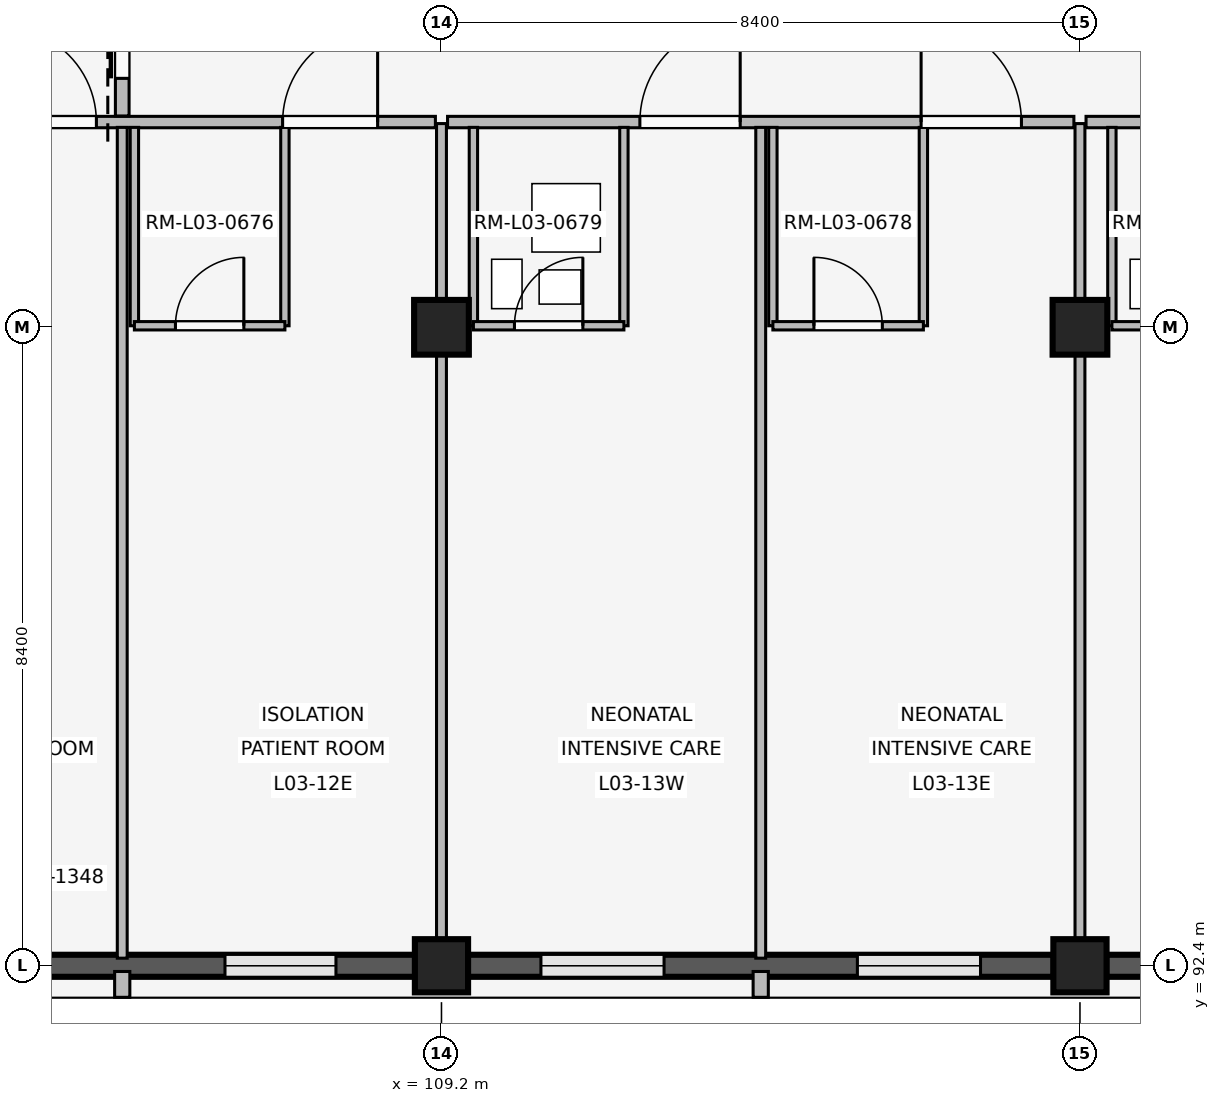
"""IFC4 building model, lengths in metres.
Left out: names, types, materials, properties, quantities, classifications, styles, units other than length and angle.
Written with IfcOpenShell. Run it as: python <this file> out.ifc"""

import sys

from ifc_helpers import new_model, si_unit, direction, frame, frame_2d, origin, origin_2d, place, context, subcontext, project, spatial, rectangle, extrude, element, fill, save


model = new_model("IFC4")
c1 = context("Model", 3, precision=1e-05, world=origin(), true_north=direction((0.0, 1.0)))
c2 = subcontext(c1, "Body", "Model", "MODEL_VIEW")
j1 = project(units=[si_unit("LENGTHUNIT", "METRE"), si_unit("PLANEANGLEUNIT", "RADIAN")], contexts=[c1])
p1 = place(None, origin())
s1 = spatial("IfcSite", under=j1, at=p1, CompositionType="ELEMENT")
p2 = place(p1, origin())
s2 = spatial("IfcBuilding", under=s1, at=p2, CompositionType="ELEMENT")
p3 = place(p2, frame((0.0, 0.0, 12.9)))
s3 = spatial("IfcBuildingStorey", under=s2, at=p3, CompositionType="ELEMENT", Elevation=12.9)
p4 = place(p3, frame((109.2, 92.4, 0.0), z_axis=(0.0, 0.0, 1.0), x_axis=(1.0, 0.0, 0.0)))
e1 = element("IfcColumn", 1, at=p4, inside=s3, PredefinedType="COLUMN", context=c2, shape_type="SweptSolid", body=[
    extrude(rectangle(XDim=0.7, YDim=0.7, at=origin_2d()), origin(), (0.0, 0.0, 1.0), 3.3),
])
p5 = place(p3, frame((109.2, 100.8, 0.0), z_axis=(0.0, 0.0, 1.0), x_axis=(1.0, 0.0, 0.0)))
e2 = element("IfcColumn", 2, at=p5, inside=s3, PredefinedType="COLUMN", context=c2, shape_type="SweptSolid", body=[
    extrude(rectangle(XDim=0.72, YDim=0.72, at=origin_2d()), origin(), (0.0, 0.0, 1.0), 3.3),
])
p6 = place(p3, frame((117.6, 92.4, 0.0), z_axis=(0.0, 0.0, 1.0), x_axis=(1.0, 0.0, 0.0)))
e3 = element("IfcColumn", 3, at=p6, inside=s3, PredefinedType="COLUMN", context=c2, shape_type="SweptSolid", body=[
    extrude(rectangle(XDim=0.7, YDim=0.7, at=origin_2d()), origin(), (0.0, 0.0, 1.0), 3.3),
])
p7 = place(p3, frame((117.6, 100.8, 0.0), z_axis=(0.0, 0.0, 1.0), x_axis=(1.0, 0.0, 0.0)))
e4 = element("IfcColumn", 4, at=p7, inside=s3, PredefinedType="COLUMN", context=c2, shape_type="SweptSolid", body=[
    extrude(rectangle(XDim=0.72, YDim=0.72, at=origin_2d()), origin(), (0.0, 0.0, 1.0), 3.3),
])
p8 = place(p3, frame((108.855, 92.4, 0.0), z_axis=(0.0, 0.0, 1.0), x_axis=(-1.0, 0.0, 0.0)))
e5 = element("IfcWall", 5, at=p8, inside=s3, PredefinedType="SOLIDWALL", context=c2, shape_type="SweptSolid", body=[
    extrude(rectangle(XDim=7.71, YDim=0.29, at=frame_2d((3.855, 0.0))), origin(), (0.0, 0.0, 1.0), 2.44),
])
p9 = place(p8, frame((1.043, 0.0, 0.85)))
e6 = element("IfcOpeningElement", 6, at=p9, cuts=e5, PredefinedType="OPENING", context=c2, shape_type="SweptSolid", body=[
    extrude(rectangle(XDim=1.46, YDim=0.85, at=frame_2d((0.73, 0.425))), frame((0.0, 0.155, 0.0), z_axis=(0.0, -1.0, 0.0), x_axis=(1.0, 0.0, 0.0)), (0.0, 0.0, 1.0), 0.31),
])
p10 = place(p8, frame((5.207, 0.0, 0.85)))
e7 = element("IfcOpeningElement", 7, at=p10, cuts=e5, PredefinedType="OPENING", context=c2, shape_type="SweptSolid", body=[
    extrude(rectangle(XDim=1.46, YDim=0.85, at=frame_2d((0.73, 0.425))), frame((0.0, 0.155, 0.0), z_axis=(0.0, -1.0, 0.0), x_axis=(1.0, 0.0, 0.0)), (0.0, 0.0, 1.0), 0.31),
])
p11 = place(p3, frame((105.0, 92.325, 0.0), z_axis=(0.0, 0.0, 1.0), x_axis=(0.0, -1.0, 0.0)))
e8 = element("IfcWall", 8, at=p11, inside=s3, PredefinedType="ELEMENTEDWALL", context=c2, shape_type="SweptSolid", body=[
    extrude(rectangle(XDim=0.34, YDim=0.2, at=frame_2d((0.17, 0.0))), origin(), (0.0, 0.0, 1.0), 2.42),
])
p12 = place(p3, frame((117.255, 92.4, 0.0), z_axis=(0.0, 0.0, 1.0), x_axis=(-1.0, 0.0, 0.0)))
e9 = element("IfcWall", 9, at=p12, inside=s3, PredefinedType="SOLIDWALL", context=c2, shape_type="SweptSolid", body=[
    extrude(rectangle(XDim=7.71, YDim=0.29, at=frame_2d((3.855, 0.0))), origin(), (0.0, 0.0, 1.0), 2.44),
])
p13 = place(p12, frame((0.963, 0.0, 0.85)))
e10 = element("IfcOpeningElement", 10, at=p13, cuts=e9, PredefinedType="OPENING", context=c2, shape_type="SweptSolid", body=[
    extrude(rectangle(XDim=1.62, YDim=0.95, at=frame_2d((0.81, 0.475))), frame((0.0, 0.155, 0.0), z_axis=(0.0, -1.0, 0.0), x_axis=(1.0, 0.0, 0.0)), (0.0, 0.0, 1.0), 0.31),
])
p14 = place(p12, frame((5.127, 0.0, 0.85)))
e11 = element("IfcOpeningElement", 11, at=p14, cuts=e9, PredefinedType="OPENING", context=c2, shape_type="SweptSolid", body=[
    extrude(rectangle(XDim=1.62, YDim=0.95, at=frame_2d((0.81, 0.475))), frame((0.0, 0.155, 0.0), z_axis=(0.0, -1.0, 0.0), x_axis=(1.0, 0.0, 0.0)), (0.0, 0.0, 1.0), 0.31),
])
p15 = place(p3, frame((113.4, 92.325, 0.0), z_axis=(0.0, 0.0, 1.0), x_axis=(0.0, -1.0, 0.0)))
e12 = element("IfcWall", 12, at=p15, inside=s3, PredefinedType="ELEMENTEDWALL", context=c2, shape_type="SweptSolid", body=[
    extrude(rectangle(XDim=0.34, YDim=0.2, at=frame_2d((0.17, 0.0))), origin(), (0.0, 0.0, 1.0), 2.42),
])
p16 = place(p3, frame((125.655, 92.4, 0.0), z_axis=(0.0, 0.0, 1.0), x_axis=(-1.0, 0.0, 0.0)))
e13 = element("IfcWall", 13, at=p16, inside=s3, PredefinedType="SOLIDWALL", context=c2, shape_type="SweptSolid", body=[
    extrude(rectangle(XDim=7.71, YDim=0.29, at=frame_2d((3.855, 0.0))), origin(), (0.0, 0.0, 1.0), 2.44),
])
p17 = place(p16, frame((1.043, 0.0, 0.85)))
e14 = element("IfcOpeningElement", 14, at=p17, cuts=e13, PredefinedType="OPENING", context=c2, shape_type="SweptSolid", body=[
    extrude(rectangle(XDim=1.46, YDim=0.85, at=frame_2d((0.73, 0.425))), frame((0.0, 0.155, 0.0), z_axis=(0.0, -1.0, 0.0), x_axis=(1.0, 0.0, 0.0)), (0.0, 0.0, 1.0), 0.31),
])
p18 = place(p16, frame((5.207, 0.0, 0.85)))
e15 = element("IfcOpeningElement", 15, at=p18, cuts=e13, PredefinedType="OPENING", context=c2, shape_type="SweptSolid", body=[
    extrude(rectangle(XDim=1.46, YDim=0.85, at=frame_2d((0.73, 0.425))), frame((0.0, 0.155, 0.0), z_axis=(0.0, -1.0, 0.0), x_axis=(1.0, 0.0, 0.0)), (0.0, 0.0, 1.0), 0.31),
])
p19 = place(p3, frame((100.88, 103.5, 0.0), z_axis=(0.0, 0.0, 1.0), x_axis=(1.0, 0.0, 0.0)))
e16 = element("IfcWall", 16, at=p19, inside=s3, PredefinedType="PARTITIONING", context=c2, shape_type="SweptSolid", body=[
    extrude(rectangle(XDim=8.24, YDim=0.15, at=frame_2d((4.12, 0.0))), origin(), (0.0, 0.0, 1.0), 2.42),
])
p20 = place(p19, frame((2.53, 0.0, 0.0)))
e17 = element("IfcOpeningElement", 17, at=p20, cuts=e16, PredefinedType="OPENING", context=c2, shape_type="SweptSolid", body=[
    extrude(rectangle(XDim=1.25, YDim=2.2, at=frame_2d((0.625, 1.1))), frame((0.0, 0.085, 0.0), z_axis=(0.0, -1.0, 0.0), x_axis=(1.0, 0.0, 0.0)), (0.0, 0.0, 1.0), 0.17),
])
p21 = place(p19, frame((6.23, 0.0, 0.0)))
e18 = element("IfcOpeningElement", 18, at=p21, cuts=e16, PredefinedType="OPENING", context=c2, shape_type="SweptSolid", body=[
    extrude(rectangle(XDim=1.25, YDim=2.2, at=frame_2d((0.625, 1.1))), frame((0.0, 0.085, 0.0), z_axis=(0.0, -1.0, 0.0), x_axis=(1.0, 0.0, 0.0)), (0.0, 0.0, 1.0), 0.17),
])
p22 = place(p3, frame((105.0, 92.5, 0.0), z_axis=(0.0, 0.0, 1.0), x_axis=(0.0, 1.0, 0.0)))
e19 = element("IfcWall", 19, at=p22, inside=s3, PredefinedType="PARTITIONING", context=c2, shape_type="SweptSolid", body=[
    extrude(rectangle(XDim=10.93, YDim=0.13, at=frame_2d((5.465, 0.0))), origin(), (0.0, 0.0, 1.0), 2.42),
])
for number, where, z_axis, x_axis in (
    (20, (105.16, 100.82, 0.0), (0.0, 0.0, 1.0), (0.0, 1.0, 0.0)),
    (21, (107.14, 100.82, 0.0), (0.0, 0.0, 1.0), (0.0, 1.0, 0.0)),
):
    element("IfcWall", number, at=place(p3, frame(where, z_axis=z_axis, x_axis=x_axis)), inside=s3, PredefinedType="PARTITIONING", context=c2, shape_type="SweptSolid", body=[
        extrude(rectangle(XDim=2.61, YDim=0.11, at=frame_2d((1.305, 0.0))), origin(), (0.0, 0.0, 1.0), 2.42),
    ])
p23 = place(p3, frame((105.16, 100.82, 0.0), z_axis=(0.0, 0.0, 1.0), x_axis=(1.0, 0.0, 0.0)))
e22 = element("IfcWall", 22, at=p23, inside=s3, PredefinedType="PARTITIONING", context=c2, shape_type="SweptSolid", body=[
    extrude(rectangle(XDim=1.98, YDim=0.11, at=frame_2d((0.99, 0.0))), origin(), (0.0, 0.0, 1.0), 2.42),
])
p24 = place(p23, frame((0.54, 0.0, 0.0)))
e23 = element("IfcOpeningElement", 23, at=p24, cuts=e22, PredefinedType="OPENING", context=c2, shape_type="SweptSolid", body=[
    extrude(rectangle(XDim=0.9, YDim=2.1, at=frame_2d((0.45, 1.05))), frame((0.0, 0.065, 0.0), z_axis=(0.0, -1.0, 0.0), x_axis=(1.0, 0.0, 0.0)), (0.0, 0.0, 1.0), 0.13),
])
p25 = place(p3, frame((103.65, 93.55, 0.0), z_axis=(0.0, 0.0, 1.0), x_axis=(1.0, 0.0, 0.0)))
e24 = element("IfcWall", 24, at=p25, inside=s3, PredefinedType="PLUMBINGWALL", context=c2, shape_type="SweptSolid", body=[
    extrude(rectangle(XDim=0.9, YDim=0.24, at=frame_2d((0.45, 0.0))), origin(), (0.0, 0.0, 1.0), 2.42),
])
p26 = place(p3, frame((105.0, 103.58, 0.0), z_axis=(0.0, 0.0, 1.0), x_axis=(0.0, 1.0, 0.0)))
e25 = element("IfcWall", 25, at=p26, inside=s3, PredefinedType="PARTITIONING", context=c2, shape_type="SweptSolid", body=[
    extrude(rectangle(XDim=2.84, YDim=0.18, at=frame_2d((1.42, 0.0))), origin(), (0.0, 0.0, 1.0), 2.42),
])
p27 = place(p26, frame((0.495, 0.0, 0.0)))
e26 = element("IfcOpeningElement", 26, at=p27, cuts=e25, PredefinedType="OPENING", context=c2, shape_type="SweptSolid", body=[
    extrude(rectangle(XDim=1.85, YDim=2.3, at=frame_2d((0.925, 1.15))), frame((0.0, 0.1, 0.0), z_axis=(0.0, -1.0, 0.0), x_axis=(1.0, 0.0, 0.0)), (0.0, 0.0, 1.0), 0.2),
])
p28 = place(p3, frame((109.2, 92.54, 0.0), z_axis=(0.0, 0.0, 1.0), x_axis=(0.0, 1.0, 0.0)))
e27 = element("IfcWall", 27, at=p28, inside=s3, PredefinedType="PARTITIONING", context=c2, shape_type="SweptSolid", body=[
    extrude(rectangle(XDim=10.94, YDim=0.13, at=frame_2d((5.47, 0.0))), origin(), (0.0, 0.0, 1.0), 2.42),
])
p29 = place(p3, frame((109.28, 103.5, 0.0), z_axis=(0.0, 0.0, 1.0), x_axis=(1.0, 0.0, 0.0)))
e28 = element("IfcWall", 28, at=p29, inside=s3, PredefinedType="PARTITIONING", context=c2, shape_type="SweptSolid", body=[
    extrude(rectangle(XDim=8.24, YDim=0.15, at=frame_2d((4.12, 0.0))), origin(), (0.0, 0.0, 1.0), 2.42),
])
p30 = place(p29, frame((2.53, 0.0, 0.0)))
e29 = element("IfcOpeningElement", 29, at=p30, cuts=e28, PredefinedType="OPENING", context=c2, shape_type="SweptSolid", body=[
    extrude(rectangle(XDim=1.32, YDim=2.25, at=frame_2d((0.66, 1.125))), frame((0.0, 0.085, 0.0), z_axis=(0.0, -1.0, 0.0), x_axis=(1.0, 0.0, 0.0)), (0.0, 0.0, 1.0), 0.17),
])
p31 = place(p29, frame((6.23, 0.0, 0.0)))
e30 = element("IfcOpeningElement", 30, at=p31, cuts=e28, PredefinedType="OPENING", context=c2, shape_type="SweptSolid", body=[
    extrude(rectangle(XDim=1.32, YDim=2.25, at=frame_2d((0.66, 1.125))), frame((0.0, 0.085, 0.0), z_axis=(0.0, -1.0, 0.0), x_axis=(1.0, 0.0, 0.0)), (0.0, 0.0, 1.0), 0.17),
])
p32 = place(p3, frame((113.4, 92.5, 0.0), z_axis=(0.0, 0.0, 1.0), x_axis=(0.0, 1.0, 0.0)))
e31 = element("IfcWall", 31, at=p32, inside=s3, PredefinedType="PARTITIONING", context=c2, shape_type="SweptSolid", body=[
    extrude(rectangle(XDim=10.93, YDim=0.13, at=frame_2d((5.465, 0.0))), origin(), (0.0, 0.0, 1.0), 2.42),
])
for number, where, z_axis, x_axis in (
    (32, (109.62, 100.82, 0.0), (0.0, 0.0, 1.0), (0.0, 1.0, 0.0)),
    (33, (111.6, 100.82, 0.0), (0.0, 0.0, 1.0), (0.0, 1.0, 0.0)),
):
    element("IfcWall", number, at=place(p3, frame(where, z_axis=z_axis, x_axis=x_axis)), inside=s3, PredefinedType="PARTITIONING", context=c2, shape_type="SweptSolid", body=[
        extrude(rectangle(XDim=2.61, YDim=0.11, at=frame_2d((1.305, 0.0))), origin(), (0.0, 0.0, 1.0), 2.42),
    ])
p33 = place(p3, frame((109.62, 100.82, 0.0), z_axis=(0.0, 0.0, 1.0), x_axis=(1.0, 0.0, 0.0)))
e34 = element("IfcWall", 34, at=p33, inside=s3, PredefinedType="PARTITIONING", context=c2, shape_type="SweptSolid", body=[
    extrude(rectangle(XDim=1.98, YDim=0.11, at=frame_2d((0.99, 0.0))), origin(), (0.0, 0.0, 1.0), 2.42),
])
p34 = place(p33, frame((0.54, 0.0, 0.0)))
e35 = element("IfcOpeningElement", 35, at=p34, cuts=e34, PredefinedType="OPENING", context=c2, shape_type="SweptSolid", body=[
    extrude(rectangle(XDim=0.9, YDim=2.1, at=frame_2d((0.45, 1.05))), frame((0.0, 0.065, 0.0), z_axis=(0.0, -1.0, 0.0), x_axis=(1.0, 0.0, 0.0)), (0.0, 0.0, 1.0), 0.13),
])
for number, where, z_axis, x_axis in (
    (36, (113.56, 100.82, 0.0), (0.0, 0.0, 1.0), (0.0, 1.0, 0.0)),
    (37, (115.54, 100.82, 0.0), (0.0, 0.0, 1.0), (0.0, 1.0, 0.0)),
):
    element("IfcWall", number, at=place(p3, frame(where, z_axis=z_axis, x_axis=x_axis)), inside=s3, PredefinedType="PARTITIONING", context=c2, shape_type="SweptSolid", body=[
        extrude(rectangle(XDim=2.61, YDim=0.11, at=frame_2d((1.305, 0.0))), origin(), (0.0, 0.0, 1.0), 2.42),
    ])
p35 = place(p3, frame((113.56, 100.82, 0.0), z_axis=(0.0, 0.0, 1.0), x_axis=(1.0, 0.0, 0.0)))
e38 = element("IfcWall", 38, at=p35, inside=s3, PredefinedType="PARTITIONING", context=c2, shape_type="SweptSolid", body=[
    extrude(rectangle(XDim=1.98, YDim=0.11, at=frame_2d((0.99, 0.0))), origin(), (0.0, 0.0, 1.0), 2.42),
])
p36 = place(p35, frame((0.54, 0.0, 0.0)))
e39 = element("IfcOpeningElement", 39, at=p36, cuts=e38, PredefinedType="OPENING", context=c2, shape_type="SweptSolid", body=[
    extrude(rectangle(XDim=0.9, YDim=2.1, at=frame_2d((0.45, 1.05))), frame((0.0, 0.065, 0.0), z_axis=(0.0, -1.0, 0.0), x_axis=(1.0, 0.0, 0.0)), (0.0, 0.0, 1.0), 0.13),
])
p37 = place(p3, frame((117.6, 92.54, 0.0), z_axis=(0.0, 0.0, 1.0), x_axis=(0.0, 1.0, 0.0)))
e40 = element("IfcWall", 40, at=p37, inside=s3, PredefinedType="PARTITIONING", context=c2, shape_type="SweptSolid", body=[
    extrude(rectangle(XDim=10.94, YDim=0.13, at=frame_2d((5.47, 0.0))), origin(), (0.0, 0.0, 1.0), 2.42),
])
p38 = place(p3, frame((117.68, 103.5, 0.0), z_axis=(0.0, 0.0, 1.0), x_axis=(1.0, 0.0, 0.0)))
e41 = element("IfcWall", 41, at=p38, inside=s3, PredefinedType="PARTITIONING", context=c2, shape_type="SweptSolid", body=[
    extrude(rectangle(XDim=8.24, YDim=0.15, at=frame_2d((4.12, 0.0))), origin(), (0.0, 0.0, 1.0), 2.42),
])
p39 = place(p38, frame((2.53, 0.0, 0.0)))
e42 = element("IfcOpeningElement", 42, at=p39, cuts=e41, PredefinedType="OPENING", context=c2, shape_type="SweptSolid", body=[
    extrude(rectangle(XDim=1.32, YDim=2.25, at=frame_2d((0.66, 1.125))), frame((0.0, 0.085, 0.0), z_axis=(0.0, -1.0, 0.0), x_axis=(1.0, 0.0, 0.0)), (0.0, 0.0, 1.0), 0.17),
])
p40 = place(p38, frame((6.23, 0.0, 0.0)))
e43 = element("IfcOpeningElement", 43, at=p40, cuts=e41, PredefinedType="OPENING", context=c2, shape_type="SweptSolid", body=[
    extrude(rectangle(XDim=1.32, YDim=2.25, at=frame_2d((0.66, 1.125))), frame((0.0, 0.085, 0.0), z_axis=(0.0, -1.0, 0.0), x_axis=(1.0, 0.0, 0.0)), (0.0, 0.0, 1.0), 0.17),
])
p41 = place(p3, frame((118.02, 100.82, 0.0), z_axis=(0.0, 0.0, 1.0), x_axis=(0.0, 1.0, 0.0)))
e44 = element("IfcWall", 44, at=p41, inside=s3, PredefinedType="PARTITIONING", context=c2, shape_type="SweptSolid", body=[
    extrude(rectangle(XDim=2.61, YDim=0.11, at=frame_2d((1.305, 0.0))), origin(), (0.0, 0.0, 1.0), 2.42),
])
p42 = place(p3, frame((118.02, 100.82, 0.0), z_axis=(0.0, 0.0, 1.0), x_axis=(1.0, 0.0, 0.0)))
e45 = element("IfcWall", 45, at=p42, inside=s3, PredefinedType="PARTITIONING", context=c2, shape_type="SweptSolid", body=[
    extrude(rectangle(XDim=1.98, YDim=0.11, at=frame_2d((0.99, 0.0))), origin(), (0.0, 0.0, 1.0), 2.42),
])
p43 = place(p42, frame((0.54, 0.0, 0.0)))
e46 = element("IfcOpeningElement", 46, at=p43, cuts=e45, PredefinedType="OPENING", context=c2, shape_type="SweptSolid", body=[
    extrude(rectangle(XDim=0.9, YDim=2.1, at=frame_2d((0.45, 1.05))), frame((0.0, 0.065, 0.0), z_axis=(0.0, -1.0, 0.0), x_axis=(1.0, 0.0, 0.0)), (0.0, 0.0, 1.0), 0.13),
])
p44 = place(p9, origin())
e47 = element("IfcWindow", 47, at=p44, inside=s3, PartitioningType="SINGLE_PANEL", PredefinedType="WINDOW", context=c2, shape_type="SweptSolid", body=[
    extrude(rectangle(XDim=1.46, YDim=0.85, at=frame_2d((0.73, 0.425))), frame((0.0, 0.03, 0.0), z_axis=(0.0, -1.0, 0.0), x_axis=(1.0, 0.0, 0.0)), (0.0, 0.0, 1.0), 0.06),
])
fill(e6, e47)
p45 = place(p13, origin())
e48 = element("IfcWindow", 48, at=p45, inside=s3, PartitioningType="SINGLE_PANEL", PredefinedType="WINDOW", context=c2, shape_type="SweptSolid", body=[
    extrude(rectangle(XDim=1.62, YDim=0.95, at=frame_2d((0.81, 0.475))), frame((0.0, 0.03, 0.0), z_axis=(0.0, -1.0, 0.0), x_axis=(1.0, 0.0, 0.0)), (0.0, 0.0, 1.0), 0.06),
])
fill(e10, e48)
p46 = place(p14, origin())
e49 = element("IfcWindow", 49, at=p46, inside=s3, PartitioningType="SINGLE_PANEL", PredefinedType="WINDOW", context=c2, shape_type="SweptSolid", body=[
    extrude(rectangle(XDim=1.62, YDim=0.95, at=frame_2d((0.81, 0.475))), frame((0.0, 0.03, 0.0), z_axis=(0.0, -1.0, 0.0), x_axis=(1.0, 0.0, 0.0)), (0.0, 0.0, 1.0), 0.06),
])
fill(e11, e49)
p47 = place(p20, origin())
e50 = element("IfcDoor", 50, at=p47, inside=s3, OperationType="SINGLE_SWING_LEFT", PredefinedType="DOOR", context=c2, shape_type="SweptSolid", body=[
    extrude(rectangle(XDim=1.25, YDim=2.2, at=frame_2d((0.625, 1.1))), frame((0.0, 0.025, 0.0), z_axis=(0.0, -1.0, 0.0), x_axis=(1.0, 0.0, 0.0)), (0.0, 0.0, 1.0), 0.05),
])
fill(e17, e50)
p48 = place(p21, origin())
e51 = element("IfcDoor", 51, at=p48, inside=s3, OperationType="SINGLE_SWING_RIGHT", PredefinedType="DOOR", context=c2, shape_type="SweptSolid", body=[
    extrude(rectangle(XDim=1.25, YDim=2.2, at=frame_2d((0.625, 1.1))), frame((0.0, 0.025, 0.0), z_axis=(0.0, -1.0, 0.0), x_axis=(1.0, 0.0, 0.0)), (0.0, 0.0, 1.0), 0.05),
])
fill(e18, e51)
p49 = place(p24, origin())
e52 = element("IfcDoor", 52, at=p49, inside=s3, OperationType="SINGLE_SWING_RIGHT", PredefinedType="DOOR", context=c2, shape_type="SweptSolid", body=[
    extrude(rectangle(XDim=0.9, YDim=2.1, at=frame_2d((0.45, 1.05))), frame((0.0, 0.025, 0.0), z_axis=(0.0, -1.0, 0.0), x_axis=(1.0, 0.0, 0.0)), (0.0, 0.0, 1.0), 0.05),
])
fill(e23, e52)
p50 = place(p27, origin())
e53 = element("IfcDoor", 53, at=p50, inside=s3, OperationType="SLIDING_TO_LEFT", PredefinedType="DOOR", context=c2, shape_type="SweptSolid", body=[
    extrude(rectangle(XDim=1.85, YDim=2.3, at=frame_2d((0.925, 1.15))), frame((0.0, 0.025, 0.0), z_axis=(0.0, -1.0, 0.0), x_axis=(1.0, 0.0, 0.0)), (0.0, 0.0, 1.0), 0.05),
])
fill(e26, e53)
p51 = place(p30, origin())
e54 = element("IfcDoor", 54, at=p51, inside=s3, OperationType="SINGLE_SWING_RIGHT", PredefinedType="DOOR", context=c2, shape_type="SweptSolid", body=[
    extrude(rectangle(XDim=1.32, YDim=2.25, at=frame_2d((0.66, 1.125))), frame((0.0, 0.025, 0.0), z_axis=(0.0, -1.0, 0.0), x_axis=(1.0, 0.0, 0.0)), (0.0, 0.0, 1.0), 0.05),
])
fill(e29, e54)
p52 = place(p31, origin())
e55 = element("IfcDoor", 55, at=p52, inside=s3, OperationType="SINGLE_SWING_LEFT", PredefinedType="DOOR", context=c2, shape_type="SweptSolid", body=[
    extrude(rectangle(XDim=1.32, YDim=2.25, at=frame_2d((0.66, 1.125))), frame((0.0, 0.025, 0.0), z_axis=(0.0, -1.0, 0.0), x_axis=(1.0, 0.0, 0.0)), (0.0, 0.0, 1.0), 0.05),
])
fill(e30, e55)
p53 = place(p34, origin())
e56 = element("IfcDoor", 56, at=p53, inside=s3, OperationType="SINGLE_SWING_RIGHT", PredefinedType="DOOR", context=c2, shape_type="SweptSolid", body=[
    extrude(rectangle(XDim=0.9, YDim=2.1, at=frame_2d((0.45, 1.05))), frame((0.0, 0.025, 0.0), z_axis=(0.0, -1.0, 0.0), x_axis=(1.0, 0.0, 0.0)), (0.0, 0.0, 1.0), 0.05),
])
fill(e35, e56)
p54 = place(p36, origin())
e57 = element("IfcDoor", 57, at=p54, inside=s3, OperationType="SINGLE_SWING_LEFT", PredefinedType="DOOR", context=c2, shape_type="SweptSolid", body=[
    extrude(rectangle(XDim=0.9, YDim=2.1, at=frame_2d((0.45, 1.05))), frame((0.0, 0.025, 0.0), z_axis=(0.0, -1.0, 0.0), x_axis=(1.0, 0.0, 0.0)), (0.0, 0.0, 1.0), 0.05),
])
fill(e39, e57)
save(model, sys.argv[1])
